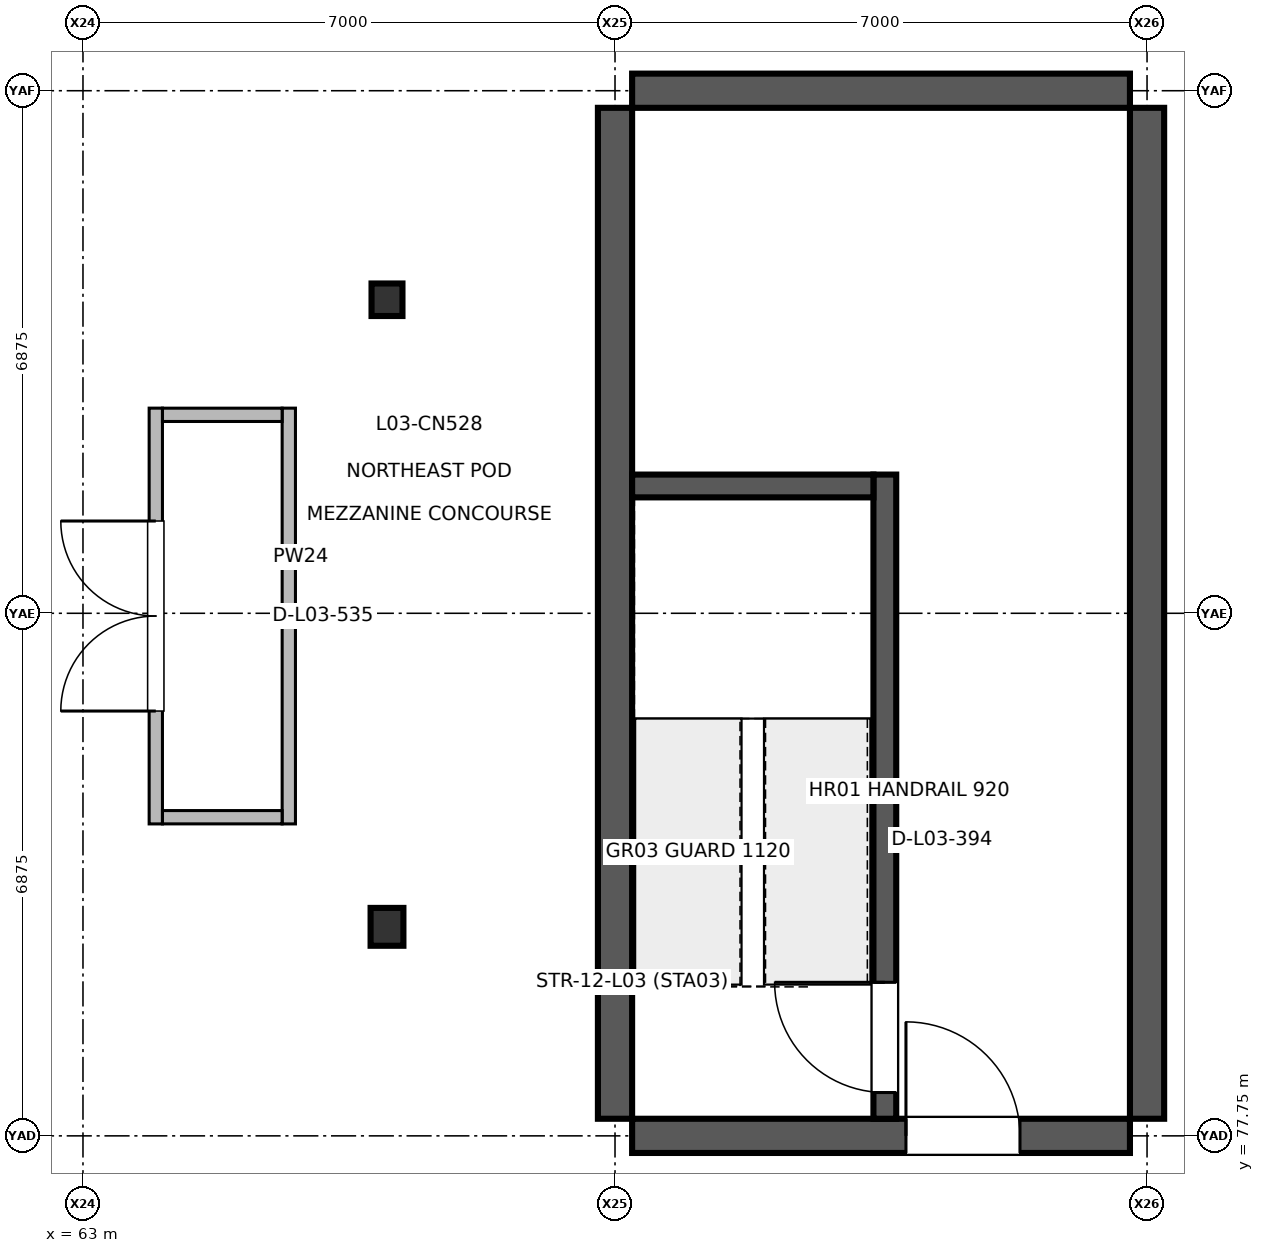
"""IFC4 building model, lengths in metres.
Left out: names, types, materials, properties, quantities, classifications, styles, units other than length and angle.
Written with IfcOpenShell. Run it as: python <this file> out.ifc"""

import sys

from ifc_helpers import new_model, si_unit, direction, frame, frame_2d, origin, origin_2d, place, context, subcontext, project, spatial, rectangle, i_section, extrude, element, fill, save


model = new_model("IFC4")
c1 = context("Model", 3, precision=1e-05, world=origin(), true_north=direction((0.0, 1.0)))
c2 = subcontext(c1, "Body", "Model", "MODEL_VIEW")
j1 = project(units=[si_unit("LENGTHUNIT", "METRE"), si_unit("PLANEANGLEUNIT", "RADIAN")], contexts=[c1])
p1 = place(None, origin())
s1 = spatial("IfcSite", under=j1, at=p1, CompositionType="ELEMENT")
p2 = place(p1, origin())
s2 = spatial("IfcBuilding", under=s1, at=p2, CompositionType="ELEMENT")
p3 = place(p2, frame((0.0, 0.0, 11.4)))
s3 = spatial("IfcBuildingStorey", under=s2, at=p3, CompositionType="ELEMENT", Elevation=11.4)
p4 = place(p3, frame((67.0, 80.5, 0.0), z_axis=(0.0, 0.0, 1.0), x_axis=(1.0, 0.0, 0.0)))
e1 = element("IfcColumn", 1, at=p4, inside=s3, PredefinedType="COLUMN", context=c2, shape_type="SweptSolid", body=[
    extrude(i_section(OverallWidth=0.432, OverallDepth=0.498, WebThickness=0.024, FlangeThickness=0.038, at=origin_2d()), origin(), (0.0, 0.0, 1.0), 4.798),
])
p5 = place(p3, frame((67.0, 88.75, 0.0), z_axis=(0.0, 0.0, 1.0), x_axis=(1.0, 0.0, 0.0)))
e2 = element("IfcColumn", 2, at=p5, inside=s3, PredefinedType="COLUMN", context=c2, shape_type="SweptSolid", body=[
    extrude(i_section(OverallWidth=0.407, OverallDepth=0.428, WebThickness=0.02, FlangeThickness=0.035, at=origin_2d()), origin(), (0.0, 0.0, 1.0), 4.798),
])
for number, where, z_axis, x_axis in (
    (3, (70.0, 77.975, 0.0), (0.0, 0.0, 1.0), (0.0, 1.0, 0.0)),
    (4, (77.0, 77.975, 0.0), (0.0, 0.0, 1.0), (0.0, 1.0, 0.0)),
):
    element("IfcWall", number, at=place(p3, frame(where, z_axis=z_axis, x_axis=x_axis)), inside=s3, PredefinedType="SHEAR", context=c2, shape_type="SweptSolid", body=[
        extrude(rectangle(XDim=13.3, YDim=0.45, at=frame_2d((6.65, 0.0))), origin(), (0.0, 0.0, 1.0), 4.48),
    ])
p6 = place(p3, frame((70.225, 77.75, 0.0), z_axis=(0.0, 0.0, 1.0), x_axis=(1.0, 0.0, 0.0)))
e5 = element("IfcWall", 5, at=p6, inside=s3, PredefinedType="SHEAR", context=c2, shape_type="SweptSolid", body=[
    extrude(rectangle(XDim=6.55, YDim=0.45, at=frame_2d((3.275, 0.0))), origin(), (0.0, 0.0, 1.0), 4.48),
])
p7 = place(p6, frame((3.603, 0.0, 0.0)))
e6 = element("IfcOpeningElement", 6, at=p7, cuts=e5, PredefinedType="OPENING", context=c2, shape_type="SweptSolid", body=[
    extrude(rectangle(XDim=1.5, YDim=2.2, at=frame_2d((0.75, 1.1))), frame((0.0, 0.235, 0.0), z_axis=(0.0, -1.0, 0.0), x_axis=(1.0, 0.0, 0.0)), (0.0, 0.0, 1.0), 0.47),
])
p8 = place(p3, frame((70.225, 91.5, 0.0), z_axis=(0.0, 0.0, 1.0), x_axis=(1.0, 0.0, 0.0)))
e7 = element("IfcWall", 7, at=p8, inside=s3, PredefinedType="SHEAR", context=c2, shape_type="SweptSolid", body=[
    extrude(rectangle(XDim=6.55, YDim=0.45, at=frame_2d((3.275, 0.0))), origin(), (0.0, 0.0, 1.0), 4.48),
])
p9 = place(p3, frame((73.55, 77.975, 0.0), z_axis=(0.0, 0.0, 1.0), x_axis=(0.0, 1.0, 0.0)))
e8 = element("IfcWall", 8, at=p9, inside=s3, PredefinedType="SHEAR", context=c2, shape_type="SweptSolid", body=[
    extrude(rectangle(XDim=8.475, YDim=0.3, at=frame_2d((4.237, 0.0))), origin(), (0.0, 0.0, 1.0), 4.48),
])
p10 = place(p9, frame((0.345, 0.0, 0.0)))
e9 = element("IfcOpeningElement", 9, at=p10, cuts=e8, PredefinedType="OPENING", context=c2, shape_type="SweptSolid", body=[
    extrude(rectangle(XDim=1.45, YDim=2.2, at=frame_2d((0.725, 1.1))), frame((0.0, 0.16, 0.0), z_axis=(0.0, -1.0, 0.0), x_axis=(1.0, 0.0, 0.0)), (0.0, 0.0, 1.0), 0.32),
])
p11 = place(p3, frame((63.958, 81.854, 0.0), z_axis=(0.0, 0.0, 1.0), x_axis=(0.0, 1.0, 0.0)))
e10 = element("IfcWall", 10, at=p11, inside=s3, PredefinedType="PARTITIONING", context=c2, shape_type="SweptSolid", body=[
    extrude(rectangle(XDim=5.47, YDim=0.175, at=frame_2d((2.735, 0.0))), origin(), (0.0, 0.0, 1.0), 3.555),
])
p12 = place(p11, frame((1.485, 0.0, 0.0)))
e11 = element("IfcOpeningElement", 11, at=p12, cuts=e10, PredefinedType="OPENING", context=c2, shape_type="SweptSolid", body=[
    extrude(rectangle(XDim=2.5, YDim=2.5, at=frame_2d((1.25, 1.25))), frame((0.0, 0.097, 0.0), z_axis=(0.0, -1.0, 0.0), x_axis=(1.0, 0.0, 0.0)), (0.0, 0.0, 1.0), 0.195),
])
p13 = place(p3, frame((65.708, 81.854, 0.0), z_axis=(0.0, 0.0, 1.0), x_axis=(0.0, 1.0, 0.0)))
e12 = element("IfcWall", 12, at=p13, inside=s3, PredefinedType="PARTITIONING", context=c2, shape_type="SweptSolid", body=[
    extrude(rectangle(XDim=5.47, YDim=0.175, at=frame_2d((2.735, 0.0))), origin(), (0.0, 0.0, 1.0), 3.555),
])
p14 = place(p3, frame((64.046, 81.942, 0.0), z_axis=(0.0, 0.0, 1.0), x_axis=(1.0, 0.0, 0.0)))
e13 = element("IfcWall", 13, at=p14, inside=s3, PredefinedType="PARTITIONING", context=c2, shape_type="SweptSolid", body=[
    extrude(rectangle(XDim=1.574, YDim=0.175, at=frame_2d((0.787, 0.0))), origin(), (0.0, 0.0, 1.0), 3.555),
])
p15 = place(p3, frame((64.046, 87.236, 0.0), z_axis=(0.0, 0.0, 1.0), x_axis=(1.0, 0.0, 0.0)))
e14 = element("IfcWall", 14, at=p15, inside=s3, PredefinedType="PARTITIONING", context=c2, shape_type="SweptSolid", body=[
    extrude(rectangle(XDim=1.574, YDim=0.175, at=frame_2d((0.787, 0.0))), origin(), (0.0, 0.0, 1.0), 3.82),
])
p16 = place(p3, frame((70.225, 86.3, 0.0), z_axis=(0.0, 0.0, 1.0), x_axis=(1.0, 0.0, 0.0)))
e15 = element("IfcWall", 15, at=p16, inside=s3, PredefinedType="SHEAR", context=c2, shape_type="SweptSolid", body=[
    extrude(rectangle(XDim=3.175, YDim=0.3, at=frame_2d((1.587, 0.0))), origin(), (0.0, 0.0, 1.0), 4.48),
])
p17 = place(p7, origin())
e16 = element("IfcDoor", 16, at=p17, inside=s3, OperationType="SINGLE_SWING_LEFT", PredefinedType="DOOR", context=c2, shape_type="SweptSolid", body=[
    extrude(rectangle(XDim=1.5, YDim=2.2, at=frame_2d((0.75, 1.1))), frame((0.0, 0.025, 0.0), z_axis=(0.0, -1.0, 0.0), x_axis=(1.0, 0.0, 0.0)), (0.0, 0.0, 1.0), 0.05),
])
fill(e6, e16)
p18 = place(p10, origin())
e17 = element("IfcDoor", 17, at=p18, inside=s3, OperationType="SINGLE_SWING_RIGHT", PredefinedType="DOOR", context=c2, shape_type="SweptSolid", body=[
    extrude(rectangle(XDim=1.45, YDim=2.2, at=frame_2d((0.725, 1.1))), frame((0.0, 0.025, 0.0), z_axis=(0.0, -1.0, 0.0), x_axis=(1.0, 0.0, 0.0)), (0.0, 0.0, 1.0), 0.05),
])
fill(e9, e17)
p19 = place(p12, origin())
e18 = element("IfcDoor", 18, at=p19, inside=s3, OperationType="DOUBLE_DOOR_SINGLE_SWING", PredefinedType="DOOR", context=c2, shape_type="SweptSolid", body=[
    extrude(rectangle(XDim=2.5, YDim=2.5, at=frame_2d((1.25, 1.25))), frame((0.0, 0.025, 0.0), z_axis=(0.0, -1.0, 0.0), x_axis=(1.0, 0.0, 0.0)), (0.0, 0.0, 1.0), 0.05),
])
fill(e11, e18)
save(model, sys.argv[1])
